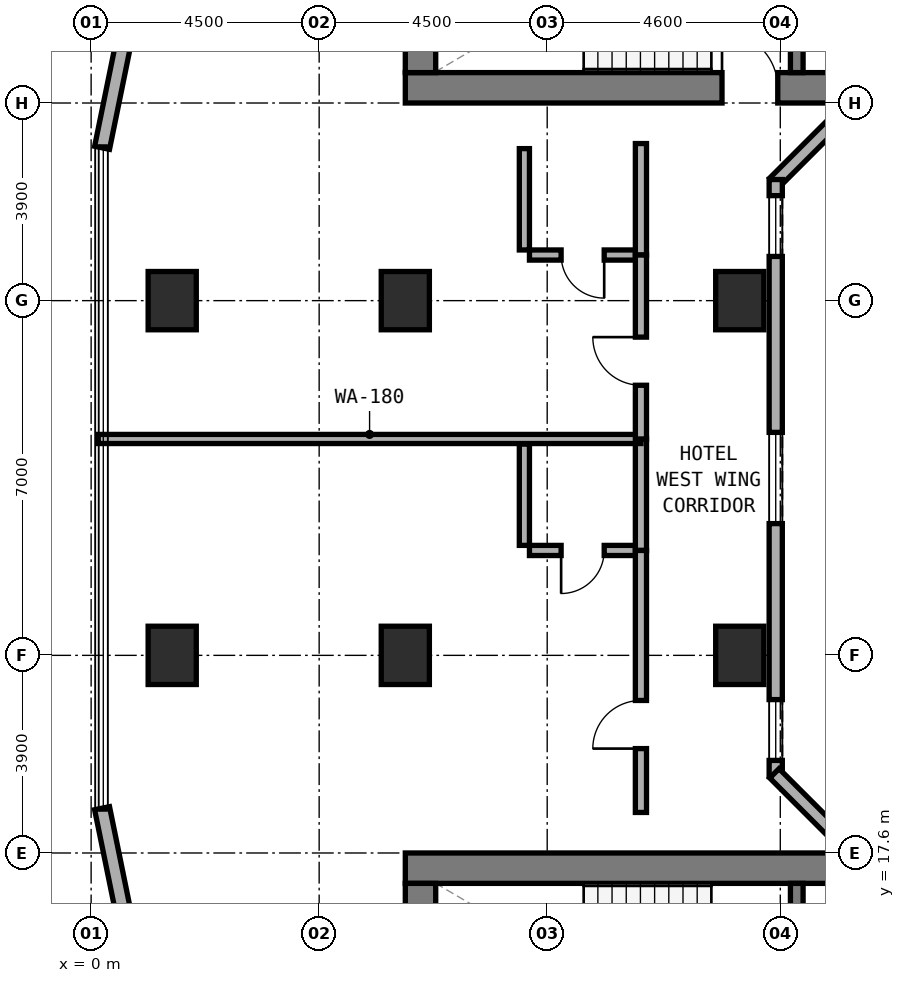
"""IFC4 building model, lengths in metres.
Left out: names, types, materials, properties, quantities, classifications, styles, units other than length and angle.
Written with IfcOpenShell. Run it as: python <this file> out.ifc"""

import sys

from ifc_helpers import new_model, si_unit, direction, frame, frame_2d, origin, origin_2d, place, context, subcontext, project, spatial, rectangle, extrude, element, fill, save


model = new_model("IFC4")
c1 = context("Model", 3, precision=1e-05, world=origin(), true_north=direction((0.0, 1.0)))
c2 = subcontext(c1, "Body", "Model", "MODEL_VIEW")
j1 = project(units=[si_unit("LENGTHUNIT", "METRE"), si_unit("PLANEANGLEUNIT", "RADIAN")], contexts=[c1])
p1 = place(None, origin())
s1 = spatial("IfcSite", under=j1, at=p1, CompositionType="ELEMENT")
p2 = place(p1, origin())
s2 = spatial("IfcBuilding", under=s1, at=p2, CompositionType="ELEMENT")
p3 = place(p2, frame((0.0, 0.0, 38.0)))
s3 = spatial("IfcBuildingStorey", under=s2, at=p3, CompositionType="ELEMENT", Elevation=38.0)
p4 = place(p3, frame((6.2, 32.7, 0.0), z_axis=(0.0, 0.0, 1.0), x_axis=(1.0, 0.0, 0.0)))
e1 = element("IfcWall", 1, at=p4, inside=s3, PredefinedType="SHEAR", context=c2, shape_type="SweptSolid", body=[
    extrude(rectangle(XDim=24.8, YDim=0.6, at=frame_2d((12.4, 0.0))), origin(), (0.0, 0.0, 1.0), 3.5),
])
p5 = place(p4, frame((6.25, 0.0, 0.0)))
e2 = element("IfcOpeningElement", 2, at=p5, cuts=e1, PredefinedType="OPENING", context=c2, shape_type="SweptSolid", body=[
    extrude(rectangle(XDim=1.1, YDim=2.15, at=frame_2d((0.55, 1.075))), frame((0.0, 0.31, 0.0), z_axis=(0.0, -1.0, 0.0), x_axis=(1.0, 0.0, 0.0)), (0.0, 0.0, 1.0), 0.62),
])
p6 = place(p3, frame((6.5, 33.0, 0.0), z_axis=(0.0, 0.0, 1.0), x_axis=(0.0, 1.0, 0.0)))
e3 = element("IfcWall", 3, at=p6, inside=s3, PredefinedType="SHEAR", context=c2, shape_type="SweptSolid", body=[
    extrude(rectangle(XDim=3.16, YDim=0.6, at=frame_2d((1.58, 0.0))), origin(), (0.0, 0.0, 1.0), 3.5),
])
p7 = place(p3, frame((13.925, 33.0, 0.0), z_axis=(0.0, 0.0, 1.0), x_axis=(0.0, 1.0, 0.0)))
e4 = element("IfcWall", 4, at=p7, inside=s3, PredefinedType="STANDARD", context=c2, shape_type="SweptSolid", body=[
    extrude(rectangle(XDim=3.16, YDim=0.25, at=frame_2d((1.58, 0.0))), origin(), (0.0, 0.0, 1.0), 3.22),
])
p8 = place(p7, frame((0.98, 0.0, 0.0)))
e5 = element("IfcOpeningElement", 5, at=p8, cuts=e4, PredefinedType="OPENING", context=c2, shape_type="SweptSolid", body=[
    extrude(rectangle(XDim=1.1, YDim=2.15, at=frame_2d((0.55, 1.075))), frame((0.0, 0.135, 0.0), z_axis=(0.0, -1.0, 0.0), x_axis=(1.0, 0.0, 0.0)), (0.0, 0.0, 1.0), 0.27),
])
p9 = place(p3, frame((6.2, 17.3, 0.0), z_axis=(0.0, 0.0, 1.0), x_axis=(1.0, 0.0, 0.0)))
e6 = element("IfcWall", 6, at=p9, inside=s3, PredefinedType="SHEAR", context=c2, shape_type="SweptSolid", body=[
    extrude(rectangle(XDim=24.8, YDim=0.6, at=frame_2d((12.4, 0.0))), origin(), (0.0, 0.0, 1.0), 3.5),
])
p10 = place(p3, frame((6.5, 13.84, 0.0), z_axis=(0.0, 0.0, 1.0), x_axis=(0.0, 1.0, 0.0)))
e7 = element("IfcWall", 7, at=p10, inside=s3, PredefinedType="SHEAR", context=c2, shape_type="SweptSolid", body=[
    extrude(rectangle(XDim=3.16, YDim=0.6, at=frame_2d((1.58, 0.0))), origin(), (0.0, 0.0, 1.0), 3.5),
])
p11 = place(p3, frame((13.925, 13.84, 0.0), z_axis=(0.0, 0.0, 1.0), x_axis=(0.0, 1.0, 0.0)))
e8 = element("IfcWall", 8, at=p11, inside=s3, PredefinedType="STANDARD", context=c2, shape_type="SweptSolid", body=[
    extrude(rectangle(XDim=3.16, YDim=0.25, at=frame_2d((1.58, 0.0))), origin(), (0.0, 0.0, 1.0), 3.22),
])
p12 = place(p11, frame((0.98, 0.0, 0.0)))
e9 = element("IfcOpeningElement", 9, at=p12, cuts=e8, PredefinedType="OPENING", context=c2, shape_type="SweptSolid", body=[
    extrude(rectangle(XDim=1.1, YDim=2.15, at=frame_2d((0.55, 1.075))), frame((0.0, 0.135, 0.0), z_axis=(0.0, -1.0, 0.0), x_axis=(1.0, 0.0, 0.0)), (0.0, 0.0, 1.0), 0.27),
])
for number, where, z_axis, x_axis in (
    (10, (6.2, 21.5, 0.0), (0.0, 0.0, 1.0), (1.0, 0.0, 0.0)),
    (11, (6.2, 28.5, 0.0), (0.0, 0.0, 1.0), (1.0, 0.0, 0.0)),
    (12, (12.8, 21.5, 0.0), (0.0, 0.0, 1.0), (1.0, 0.0, 0.0)),
    (13, (12.8, 28.5, 0.0), (0.0, 0.0, 1.0), (1.0, 0.0, 0.0)),
    (14, (1.6, 21.5, 0.0), (0.0, 0.0, 1.0), (1.0, 0.0, 0.0)),
    (15, (1.6, 28.5, 0.0), (0.0, 0.0, 1.0), (1.0, 0.0, 0.0)),
):
    element("IfcColumn", number, at=place(p3, frame(where, z_axis=z_axis, x_axis=x_axis)), inside=s3, PredefinedType="COLUMN", context=c2, shape_type="SweptSolid", body=[
        extrude(rectangle(XDim=0.95, YDim=1.15, at=origin_2d()), origin(), (0.0, 0.0, 1.0), 3.5),
    ])
p13 = place(p3, frame((2.229, 41.378, 0.0), z_axis=(0.0, 0.0, 1.0), x_axis=(-0.199990901713, -0.979797754249, 0.0)))
e16 = element("IfcWall", 16, at=p13, inside=s3, PredefinedType="STANDARD", context=c2, shape_type="SweptSolid", body=[
    extrude(rectangle(XDim=10.065, YDim=0.3, at=frame_2d((5.033, 0.0))), origin(), (0.0, 0.0, 1.0), 3.22),
])
p14 = place(p13, frame((0.378, 0.0, 0.85)))
e17 = element("IfcOpeningElement", 17, at=p14, cuts=e16, PredefinedType="OPENING", context=c2, shape_type="SweptSolid", body=[
    extrude(rectangle(XDim=1.8, YDim=1.5, at=frame_2d((0.9, 0.75))), frame((0.0, 0.16, 0.0), z_axis=(0.0, -1.0, 0.0), x_axis=(1.0, 0.0, 0.0)), (0.0, 0.0, 1.0), 0.32),
])
p15 = place(p13, frame((5.236, 0.0, 0.8)))
e18 = element("IfcOpeningElement", 18, at=p15, cuts=e16, PredefinedType="OPENING", context=c2, shape_type="SweptSolid", body=[
    extrude(rectangle(XDim=2.4, YDim=1.6, at=frame_2d((1.2, 0.8))), frame((0.0, 0.16, 0.0), z_axis=(0.0, -1.0, 0.0), x_axis=(1.0, 0.0, 0.0)), (0.0, 0.0, 1.0), 0.32),
])
p16 = place(p3, frame((0.216, 18.484, 0.0), z_axis=(0.0, 0.0, 1.0), x_axis=(0.199990901713, -0.979797754249, 0.0)))
e19 = element("IfcWall", 19, at=p16, inside=s3, PredefinedType="STANDARD", context=c2, shape_type="SweptSolid", body=[
    extrude(rectangle(XDim=10.065, YDim=0.3, at=frame_2d((5.033, 0.0))), origin(), (0.0, 0.0, 1.0), 3.22),
])
p17 = place(p16, frame((2.429, 0.0, 0.8)))
e20 = element("IfcOpeningElement", 20, at=p17, cuts=e19, PredefinedType="OPENING", context=c2, shape_type="SweptSolid", body=[
    extrude(rectangle(XDim=2.4, YDim=1.6, at=frame_2d((1.2, 0.8))), frame((0.0, 0.16, 0.0), z_axis=(0.0, -1.0, 0.0), x_axis=(1.0, 0.0, 0.0)), (0.0, 0.0, 1.0), 0.32),
])
p18 = place(p16, frame((7.887, 0.0, 0.85)))
e21 = element("IfcOpeningElement", 21, at=p18, cuts=e19, PredefinedType="OPENING", context=c2, shape_type="SweptSolid", body=[
    extrude(rectangle(XDim=1.8, YDim=1.5, at=frame_2d((0.9, 0.75))), frame((0.0, 0.16, 0.0), z_axis=(0.0, -1.0, 0.0), x_axis=(1.0, 0.0, 0.0)), (0.0, 0.0, 1.0), 0.32),
])
p19 = place(p3, frame((15.318, 32.662, 0.0), z_axis=(0.0, 0.0, 1.0), x_axis=(-0.707106781187, -0.707106781187, 0.0)))
e22 = element("IfcWall", 22, at=p19, inside=s3, PredefinedType="STANDARD", context=c2, shape_type="SweptSolid", body=[
    extrude(rectangle(XDim=2.594, YDim=0.26, at=frame_2d((1.297, 0.0))), origin(), (0.0, 0.0, 1.0), 3.22),
])
p20 = place(p3, frame((13.51, 30.89, 0.0), z_axis=(0.0, 0.0, 1.0), x_axis=(0.0, -1.0, 0.0)))
e23 = element("IfcWall", 23, at=p20, inside=s3, PredefinedType="STANDARD", context=c2, shape_type="SweptSolid", body=[
    extrude(rectangle(XDim=11.78, YDim=0.26, at=frame_2d((5.89, 0.0))), origin(), (0.0, 0.0, 1.0), 3.22),
])
p21 = place(p20, frame((0.318, 0.0, 0.85)))
e24 = element("IfcOpeningElement", 24, at=p21, cuts=e23, PredefinedType="OPENING", context=c2, shape_type="SweptSolid", body=[
    extrude(rectangle(XDim=1.2, YDim=1.5, at=frame_2d((0.6, 0.75))), frame((0.0, 0.14, 0.0), z_axis=(0.0, -1.0, 0.0), x_axis=(1.0, 0.0, 0.0)), (0.0, 0.0, 1.0), 0.28),
])
p22 = place(p20, frame((4.99, 0.0, 0.85)))
e25 = element("IfcOpeningElement", 25, at=p22, cuts=e23, PredefinedType="OPENING", context=c2, shape_type="SweptSolid", body=[
    extrude(rectangle(XDim=1.8, YDim=1.5, at=frame_2d((0.9, 0.75))), frame((0.0, 0.14, 0.0), z_axis=(0.0, -1.0, 0.0), x_axis=(1.0, 0.0, 0.0)), (0.0, 0.0, 1.0), 0.28),
])
p23 = place(p20, frame((10.263, 0.0, 0.85)))
e26 = element("IfcOpeningElement", 26, at=p23, cuts=e23, PredefinedType="OPENING", context=c2, shape_type="SweptSolid", body=[
    extrude(rectangle(XDim=1.2, YDim=1.5, at=frame_2d((0.6, 0.75))), frame((0.0, 0.14, 0.0), z_axis=(0.0, -1.0, 0.0), x_axis=(1.0, 0.0, 0.0)), (0.0, 0.0, 1.0), 0.28),
])
p24 = place(p3, frame((13.484, 19.172, 0.0), z_axis=(0.0, 0.0, 1.0), x_axis=(0.707106781187, -0.707106781187, 0.0)))
e27 = element("IfcWall", 27, at=p24, inside=s3, PredefinedType="STANDARD", context=c2, shape_type="SweptSolid", body=[
    extrude(rectangle(XDim=2.594, YDim=0.26, at=frame_2d((1.297, 0.0))), origin(), (0.0, 0.0, 1.0), 3.22),
])
p25 = place(p3, frame((8.65, 23.57, 0.0), z_axis=(0.0, 0.0, 1.0), x_axis=(1.0, 0.0, 0.0)))
e28 = element("IfcWall", 28, at=p25, inside=s3, PredefinedType="PLUMBINGWALL", context=c2, shape_type="SweptSolid", body=[
    extrude(rectangle(XDim=2.1, YDim=0.2, at=frame_2d((1.05, 0.0))), origin(), (0.0, 0.0, 1.0), 3.22),
])
p26 = place(p25, frame((0.625, 0.0, 0.0)))
e29 = element("IfcOpeningElement", 29, at=p26, cuts=e28, PredefinedType="OPENING", context=c2, shape_type="SweptSolid", body=[
    extrude(rectangle(XDim=0.85, YDim=2.1, at=frame_2d((0.425, 1.05))), frame((0.0, 0.11, 0.0), z_axis=(0.0, -1.0, 0.0), x_axis=(1.0, 0.0, 0.0)), (0.0, 0.0, 1.0), 0.22),
])
p27 = place(p3, frame((8.55, 23.67, 0.0), z_axis=(0.0, 0.0, 1.0), x_axis=(0.0, 1.0, 0.0)))
e30 = element("IfcWall", 30, at=p27, inside=s3, PredefinedType="PLUMBINGWALL", context=c2, shape_type="SweptSolid", body=[
    extrude(rectangle(XDim=2.0, YDim=0.2, at=frame_2d((1.0, 0.0))), origin(), (0.0, 0.0, 1.0), 3.22),
])
p28 = place(p3, frame((10.85, 23.57, 0.0), z_axis=(0.0, 0.0, 1.0), x_axis=(0.0, 1.0, 0.0)))
e31 = element("IfcWall", 31, at=p28, inside=s3, PredefinedType="SOLIDWALL", context=c2, shape_type="SweptSolid", body=[
    extrude(rectangle(XDim=2.2, YDim=0.22, at=frame_2d((1.1, 0.0))), origin(), (0.0, 0.0, 1.0), 3.22),
])
p29 = place(p3, frame((10.85, 18.4, 0.0), z_axis=(0.0, 0.0, 1.0), x_axis=(0.0, 1.0, 0.0)))
e32 = element("IfcWall", 32, at=p29, inside=s3, PredefinedType="SOLIDWALL", context=c2, shape_type="SweptSolid", body=[
    extrude(rectangle(XDim=5.17, YDim=0.22, at=frame_2d((2.585, 0.0))), origin(), (0.0, 0.0, 1.0), 2.395),
])
p30 = place(p29, frame((1.26, 0.0, 0.0)))
e33 = element("IfcOpeningElement", 33, at=p30, cuts=e32, PredefinedType="OPENING", context=c2, shape_type="SweptSolid", body=[
    extrude(rectangle(XDim=0.95, YDim=2.1, at=frame_2d((0.475, 1.05))), frame((0.0, 0.12, 0.0), z_axis=(0.0, -1.0, 0.0), x_axis=(1.0, 0.0, 0.0)), (0.0, 0.0, 1.0), 0.24),
])
p31 = place(p3, frame((0.14, 25.77, 0.0), z_axis=(0.0, 0.0, 1.0), x_axis=(1.0, 0.0, 0.0)))
e34 = element("IfcWall", 34, at=p31, inside=s3, PredefinedType="SOLIDWALL", context=c2, shape_type="SweptSolid", body=[
    extrude(rectangle(XDim=10.71, YDim=0.18, at=frame_2d((5.355, 0.0))), origin(), (0.0, 0.0, 1.0), 2.745),
])
p32 = place(p3, frame((8.65, 29.4, 0.0), z_axis=(0.0, 0.0, 1.0), x_axis=(1.0, 0.0, 0.0)))
e35 = element("IfcWall", 35, at=p32, inside=s3, PredefinedType="PLUMBINGWALL", context=c2, shape_type="SweptSolid", body=[
    extrude(rectangle(XDim=2.1, YDim=0.2, at=frame_2d((1.05, 0.0))), origin(), (0.0, 0.0, 1.0), 3.22),
])
p33 = place(p32, frame((0.625, 0.0, 0.0)))
e36 = element("IfcOpeningElement", 36, at=p33, cuts=e35, PredefinedType="OPENING", context=c2, shape_type="SweptSolid", body=[
    extrude(rectangle(XDim=0.85, YDim=2.1, at=frame_2d((0.425, 1.05))), frame((0.0, 0.11, 0.0), z_axis=(0.0, -1.0, 0.0), x_axis=(1.0, 0.0, 0.0)), (0.0, 0.0, 1.0), 0.22),
])
p34 = place(p3, frame((8.55, 29.5, 0.0), z_axis=(0.0, 0.0, 1.0), x_axis=(0.0, 1.0, 0.0)))
e37 = element("IfcWall", 37, at=p34, inside=s3, PredefinedType="PLUMBINGWALL", context=c2, shape_type="SweptSolid", body=[
    extrude(rectangle(XDim=2.0, YDim=0.2, at=frame_2d((1.0, 0.0))), origin(), (0.0, 0.0, 1.0), 3.22),
])
p35 = place(p3, frame((10.85, 29.4, 0.0), z_axis=(0.0, 0.0, 1.0), x_axis=(0.0, 1.0, 0.0)))
e38 = element("IfcWall", 38, at=p35, inside=s3, PredefinedType="SOLIDWALL", context=c2, shape_type="SweptSolid", body=[
    extrude(rectangle(XDim=2.2, YDim=0.22, at=frame_2d((1.1, 0.0))), origin(), (0.0, 0.0, 1.0), 3.22),
])
p36 = place(p3, frame((10.85, 25.77, 0.0), z_axis=(0.0, 0.0, 1.0), x_axis=(0.0, 1.0, 0.0)))
e39 = element("IfcWall", 39, at=p36, inside=s3, PredefinedType="SOLIDWALL", context=c2, shape_type="SweptSolid", body=[
    extrude(rectangle(XDim=3.63, YDim=0.22, at=frame_2d((1.815, 0.0))), origin(), (0.0, 0.0, 1.0), 2.395),
])
p37 = place(p36, frame((1.06, 0.0, 0.0)))
e40 = element("IfcOpeningElement", 40, at=p37, cuts=e39, PredefinedType="OPENING", context=c2, shape_type="SweptSolid", body=[
    extrude(rectangle(XDim=0.95, YDim=2.1, at=frame_2d((0.475, 1.05))), frame((0.0, 0.12, 0.0), z_axis=(0.0, -1.0, 0.0), x_axis=(1.0, 0.0, 0.0)), (0.0, 0.0, 1.0), 0.24),
])
p38 = place(p21, origin())
e41 = element("IfcWindow", 41, at=p38, inside=s3, PartitioningType="SINGLE_PANEL", PredefinedType="WINDOW", context=c2, shape_type="SweptSolid", body=[
    extrude(rectangle(XDim=1.2, YDim=1.5, at=frame_2d((0.6, 0.75))), frame((0.0, 0.03, 0.0), z_axis=(0.0, -1.0, 0.0), x_axis=(1.0, 0.0, 0.0)), (0.0, 0.0, 1.0), 0.06),
])
fill(e24, e41)
p39 = place(p22, origin())
e42 = element("IfcWindow", 42, at=p39, inside=s3, PartitioningType="SINGLE_PANEL", PredefinedType="WINDOW", context=c2, shape_type="SweptSolid", body=[
    extrude(rectangle(XDim=1.8, YDim=1.5, at=frame_2d((0.9, 0.75))), frame((0.0, 0.03, 0.0), z_axis=(0.0, -1.0, 0.0), x_axis=(1.0, 0.0, 0.0)), (0.0, 0.0, 1.0), 0.06),
])
fill(e25, e42)
p40 = place(p23, origin())
e43 = element("IfcWindow", 43, at=p40, inside=s3, PartitioningType="SINGLE_PANEL", PredefinedType="WINDOW", context=c2, shape_type="SweptSolid", body=[
    extrude(rectangle(XDim=1.2, YDim=1.5, at=frame_2d((0.6, 0.75))), frame((0.0, 0.03, 0.0), z_axis=(0.0, -1.0, 0.0), x_axis=(1.0, 0.0, 0.0)), (0.0, 0.0, 1.0), 0.06),
])
fill(e26, e43)
p41 = place(p5, origin())
e44 = element("IfcDoor", 44, at=p41, inside=s3, OperationType="SINGLE_SWING_LEFT", PredefinedType="DOOR", context=c2, shape_type="SweptSolid", body=[
    extrude(rectangle(XDim=1.1, YDim=2.15, at=frame_2d((0.55, 1.075))), frame((0.0, 0.025, 0.0), z_axis=(0.0, -1.0, 0.0), x_axis=(1.0, 0.0, 0.0)), (0.0, 0.0, 1.0), 0.05),
])
fill(e2, e44)
p42 = place(p26, frame((0.85, 0.0, 0.0), z_axis=(0.0, 0.0, 1.0), x_axis=(-1.0, 0.0, 0.0)))
e45 = element("IfcDoor", 45, at=p42, inside=s3, OperationType="SINGLE_SWING_RIGHT", PredefinedType="DOOR", context=c2, shape_type="SweptSolid", body=[
    extrude(rectangle(XDim=0.85, YDim=2.1, at=frame_2d((0.425, 1.05))), frame((0.0, 0.025, 0.0), z_axis=(0.0, -1.0, 0.0), x_axis=(1.0, 0.0, 0.0)), (0.0, 0.0, 1.0), 0.05),
])
fill(e29, e45)
p43 = place(p30, origin())
e46 = element("IfcDoor", 46, at=p43, inside=s3, OperationType="SINGLE_SWING_LEFT", PredefinedType="DOOR", context=c2, shape_type="SweptSolid", body=[
    extrude(rectangle(XDim=0.95, YDim=2.1, at=frame_2d((0.475, 1.05))), frame((0.0, 0.025, 0.0), z_axis=(0.0, -1.0, 0.0), x_axis=(1.0, 0.0, 0.0)), (0.0, 0.0, 1.0), 0.05),
])
fill(e33, e46)
p44 = place(p33, frame((0.85, 0.0, 0.0), z_axis=(0.0, 0.0, 1.0), x_axis=(-1.0, 0.0, 0.0)))
e47 = element("IfcDoor", 47, at=p44, inside=s3, OperationType="SINGLE_SWING_LEFT", PredefinedType="DOOR", context=c2, shape_type="SweptSolid", body=[
    extrude(rectangle(XDim=0.85, YDim=2.1, at=frame_2d((0.425, 1.05))), frame((0.0, 0.025, 0.0), z_axis=(0.0, -1.0, 0.0), x_axis=(1.0, 0.0, 0.0)), (0.0, 0.0, 1.0), 0.05),
])
fill(e36, e47)
p45 = place(p37, origin())
e48 = element("IfcDoor", 48, at=p45, inside=s3, OperationType="SINGLE_SWING_RIGHT", PredefinedType="DOOR", context=c2, shape_type="SweptSolid", body=[
    extrude(rectangle(XDim=0.95, YDim=2.1, at=frame_2d((0.475, 1.05))), frame((0.0, 0.025, 0.0), z_axis=(0.0, -1.0, 0.0), x_axis=(1.0, 0.0, 0.0)), (0.0, 0.0, 1.0), 0.05),
])
fill(e40, e48)
save(model, sys.argv[1])
